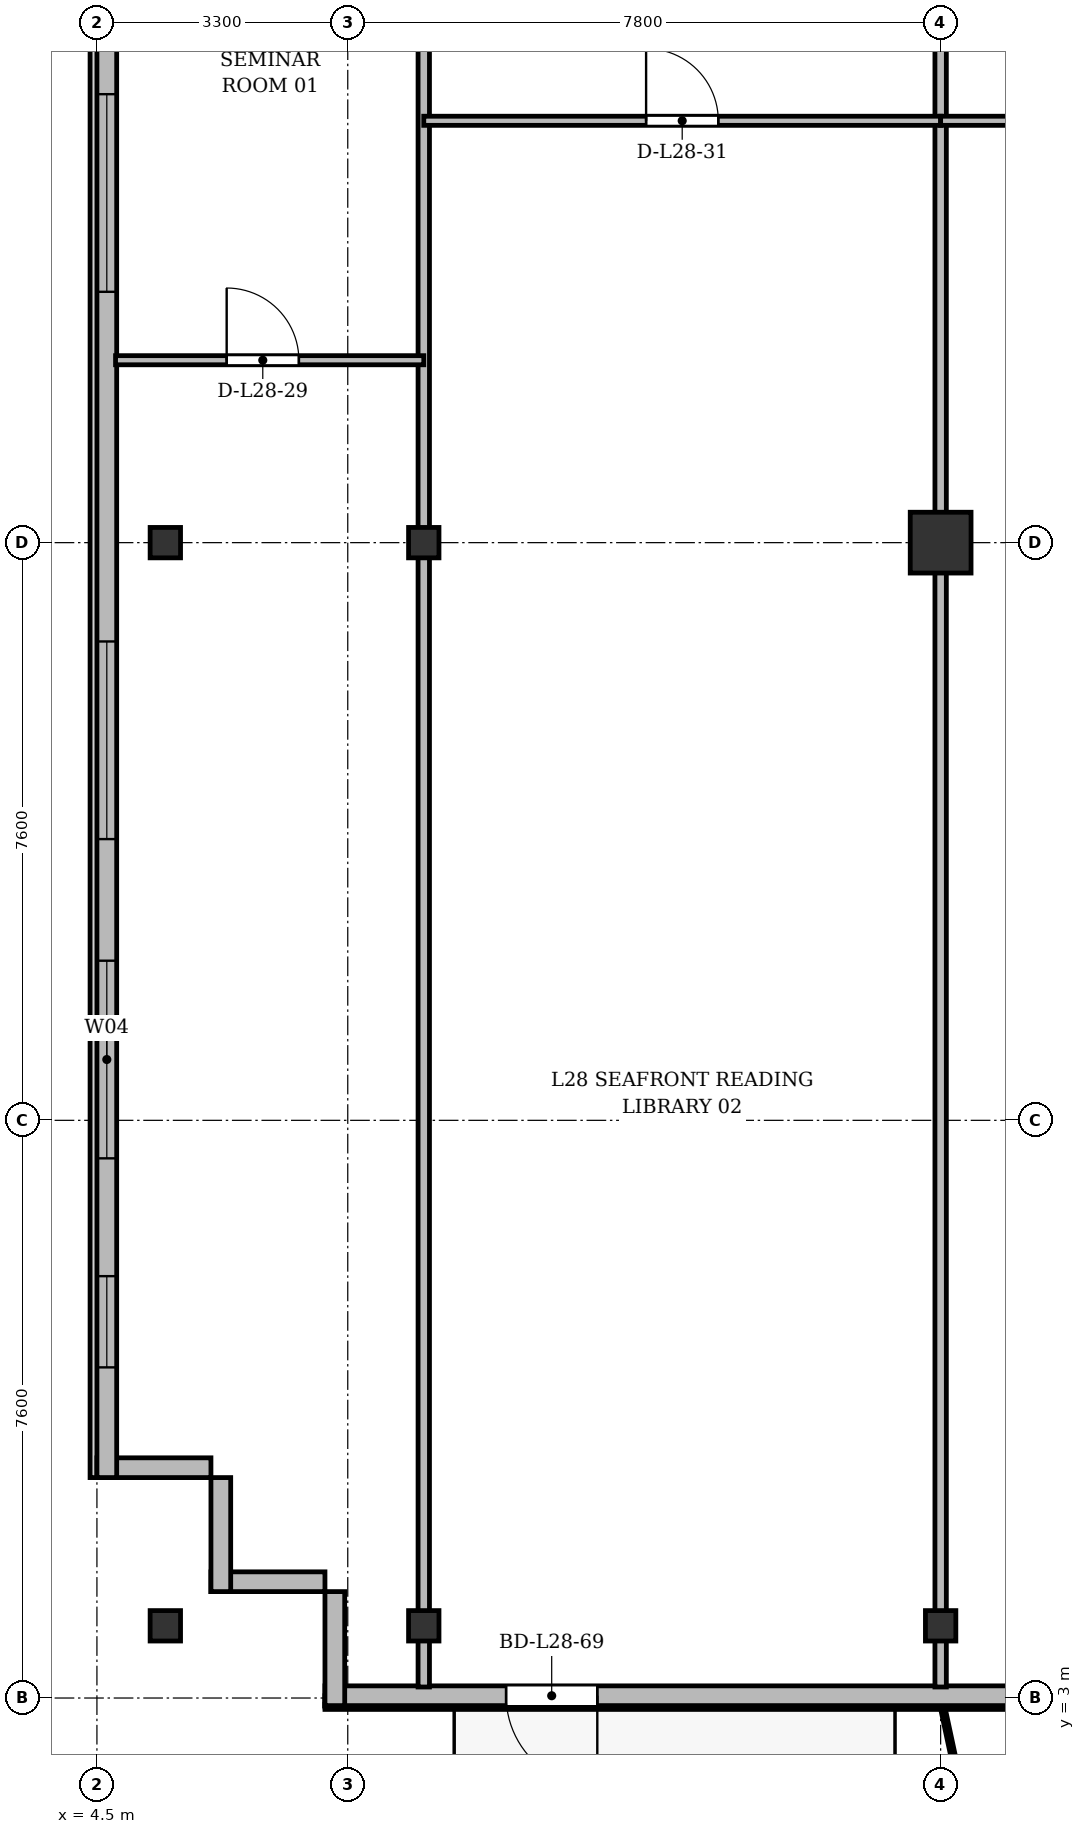
"""IFC4 building model, lengths in metres.
Left out: names, types, materials, properties, quantities, classifications, styles, units other than length and angle.
Written with IfcOpenShell. Run it as: python <this file> out.ifc"""

import sys

from ifc_helpers import new_model, si_unit, direction, frame, frame_2d, origin, origin_2d, place, context, subcontext, project, spatial, rectangle, i_section, extrude, source, transform, mapped, element, fill, save


model = new_model("IFC4")
c1 = context("Model", 3, precision=1e-05, world=origin(), true_north=direction((0.0, 1.0)))
c2 = subcontext(c1, "Body", "Model", "MODEL_VIEW")
j1 = project(units=[si_unit("LENGTHUNIT", "METRE"), si_unit("PLANEANGLEUNIT", "RADIAN")], contexts=[c1])
p1 = place(None, origin())
s1 = spatial("IfcSite", under=j1, at=p1, CompositionType="ELEMENT")
p2 = place(p1, origin())
s2 = spatial("IfcBuilding", under=s1, at=p2, CompositionType="ELEMENT")
p3 = place(p2, frame((0.0, 0.0, 110.5)))
s3 = spatial("IfcBuildingStorey", under=s2, at=p3, CompositionType="ELEMENT", Elevation=110.5)
m1 = source(origin(), c2, "Body", "SweptSolid", [
    extrude(i_section(OverallWidth=0.4, OverallDepth=0.4, WebThickness=0.022, FlangeThickness=0.035, at=origin_2d()), origin(), (0.0, 0.0, 1.0), 3.6),
])
for number, where, z_axis, x_axis in (
    (1, (5.4, 3.95, 0.0), (0.0, 0.0, 1.0), (1.0, 0.0, 0.0)),
    (2, (5.4, 18.2, 0.0), (0.0, 0.0, 1.0), (1.0, 0.0, 0.0)),
    (3, (8.8, 3.95, 0.0), (0.0, 0.0, 1.0), (1.0, 0.0, 0.0)),
    (4, (8.8, 18.2, 0.0), (0.0, 0.0, 1.0), (1.0, 0.0, 0.0)),
    (5, (15.6, 3.95, 0.0), (0.0, 0.0, 1.0), (1.0, 0.0, 0.0)),
):
    element("IfcColumn", number, at=place(p3, frame(where, z_axis=z_axis, x_axis=x_axis)), inside=s3, PredefinedType="COLUMN", context=c2, shape_type="MappedRepresentation", body=[
        mapped(m1, transform((0.0, 0.0, 0.0), x_axis=(1.0, 0.0, 0.0), y_axis=(0.0, 1.0, 0.0), z_axis=(0.0, 0.0, 1.0), scale=1.0)),
    ])
m2 = source(origin(), c2, "Body", "SweptSolid", [
    extrude(rectangle(XDim=0.8, YDim=0.8, at=origin_2d()), origin(), (0.0, 0.0, 1.0), 3.6),
])
p4 = place(p3, frame((15.6, 18.2, 0.0), z_axis=(0.0, 0.0, 1.0), x_axis=(1.0, 0.0, 0.0)))
e6 = element("IfcColumn", 6, at=p4, inside=s3, PredefinedType="COLUMN", context=c2, shape_type="MappedRepresentation", body=[
    mapped(m2, transform((0.0, 0.0, 0.0), x_axis=(1.0, 0.0, 0.0), y_axis=(0.0, 1.0, 0.0), z_axis=(0.0, 0.0, 1.0), scale=1.0)),
])
for number, where, z_axis, x_axis in (
    (7, (7.5, 4.53, 0.0), (0.0, 0.0, 1.0), (-1.0, 0.0, 0.0)),
    (8, (6.13, 4.4, 0.0), (0.0, 0.0, 1.0), (0.0, 1.0, 0.0)),
):
    element("IfcWall", number, at=place(p3, frame(where, z_axis=z_axis, x_axis=x_axis)), inside=s3, PredefinedType="SOLIDWALL", context=c2, shape_type="SweptSolid", body=[
        extrude(rectangle(XDim=1.5, YDim=0.26, at=frame_2d((0.75, 0.0))), origin(), (0.0, 0.0, 1.0), 3.34),
    ])
p5 = place(p3, frame((6.0, 6.03, 0.0), z_axis=(0.0, 0.0, 1.0), x_axis=(-1.0, 0.0, 0.0)))
e9 = element("IfcWall", 9, at=p5, inside=s3, PredefinedType="SOLIDWALL", context=c2, shape_type="SweptSolid", body=[
    extrude(rectangle(XDim=1.5, YDim=0.26, at=frame_2d((0.75, 0.0))), origin(), (0.0, 0.0, 1.0), 2.84),
])
p6 = place(p3, frame((4.63, 5.9, 0.0), z_axis=(0.0, 0.0, 1.0), x_axis=(0.0, 1.0, 0.0)))
e10 = element("IfcWall", 10, at=p6, inside=s3, PredefinedType="SOLIDWALL", context=c2, shape_type="SweptSolid", body=[
    extrude(rectangle(XDim=39.6, YDim=0.26, at=frame_2d((19.8, 0.0))), origin(), (0.0, 0.0, 1.0), 3.34),
])
p7 = place(p6, frame((1.45, 0.0, 0.92)))
e11 = element("IfcOpeningElement", 11, at=p7, cuts=e10, PredefinedType="OPENING", context=c2, shape_type="SweptSolid", body=[
    extrude(rectangle(XDim=1.2, YDim=1.65, at=frame_2d((0.6, 0.825))), frame((0.0, 0.14, 0.0), z_axis=(0.0, -1.0, 0.0), x_axis=(1.0, 0.0, 0.0)), (0.0, 0.0, 1.0), 0.28),
])
p8 = place(p6, frame((4.2, 0.0, 0.92)))
e12 = element("IfcOpeningElement", 12, at=p8, cuts=e10, PredefinedType="OPENING", context=c2, shape_type="SweptSolid", body=[
    extrude(rectangle(XDim=2.6, YDim=1.9, at=frame_2d((1.3, 0.95))), frame((0.0, 0.14, 0.0), z_axis=(0.0, -1.0, 0.0), x_axis=(1.0, 0.0, 0.0)), (0.0, 0.0, 1.0), 0.28),
])
p9 = place(p6, frame((8.4, 0.0, 0.92)))
e13 = element("IfcOpeningElement", 13, at=p9, cuts=e10, PredefinedType="OPENING", context=c2, shape_type="SweptSolid", body=[
    extrude(rectangle(XDim=2.6, YDim=1.9, at=frame_2d((1.3, 0.95))), frame((0.0, 0.14, 0.0), z_axis=(0.0, -1.0, 0.0), x_axis=(1.0, 0.0, 0.0)), (0.0, 0.0, 1.0), 0.28),
])
p10 = place(p6, frame((15.6, 0.0, 0.92)))
e14 = element("IfcOpeningElement", 14, at=p10, cuts=e10, PredefinedType="OPENING", context=c2, shape_type="SweptSolid", body=[
    extrude(rectangle(XDim=2.6, YDim=1.9, at=frame_2d((1.3, 0.95))), frame((0.0, 0.14, 0.0), z_axis=(0.0, -1.0, 0.0), x_axis=(1.0, 0.0, 0.0)), (0.0, 0.0, 1.0), 0.28),
])
p11 = place(p6, frame((29.6, 0.0, 0.92)))
e15 = element("IfcOpeningElement", 15, at=p11, cuts=e10, PredefinedType="OPENING", context=c2, shape_type="SweptSolid", body=[
    extrude(rectangle(XDim=2.6, YDim=1.9, at=frame_2d((1.3, 0.95))), frame((0.0, 0.14, 0.0), z_axis=(0.0, -1.0, 0.0), x_axis=(1.0, 0.0, 0.0)), (0.0, 0.0, 1.0), 0.28),
])
p12 = place(p6, frame((33.9, 0.0, 0.92)))
e16 = element("IfcOpeningElement", 16, at=p12, cuts=e10, PredefinedType="OPENING", context=c2, shape_type="SweptSolid", body=[
    extrude(rectangle(XDim=1.2, YDim=1.65, at=frame_2d((0.6, 0.825))), frame((0.0, 0.14, 0.0), z_axis=(0.0, -1.0, 0.0), x_axis=(1.0, 0.0, 0.0)), (0.0, 0.0, 1.0), 0.28),
])
p13 = place(p6, frame((37.25, 0.0, 0.92)))
e17 = element("IfcOpeningElement", 17, at=p13, cuts=e10, PredefinedType="OPENING", context=c2, shape_type="SweptSolid", body=[
    extrude(rectangle(XDim=1.2, YDim=1.65, at=frame_2d((0.6, 0.825))), frame((0.0, 0.14, 0.0), z_axis=(0.0, -1.0, 0.0), x_axis=(1.0, 0.0, 0.0)), (0.0, 0.0, 1.0), 0.28),
])
p14 = place(p3, frame((66.9, 3.03, 0.0), z_axis=(0.0, 0.0, 1.0), x_axis=(-1.0, 0.0, 0.0)))
e18 = element("IfcWall", 18, at=p14, inside=s3, PredefinedType="SOLIDWALL", context=c2, shape_type="SweptSolid", body=[
    extrude(rectangle(XDim=59.4, YDim=0.26, at=frame_2d((29.7, 0.0))), origin(), (0.0, 0.0, 1.0), 3.34),
])
p15 = place(p14, frame((2.175, 0.0, 0.9)))
e19 = element("IfcOpeningElement", 19, at=p15, cuts=e18, PredefinedType="OPENING", context=c2, shape_type="SweptSolid", body=[
    extrude(rectangle(XDim=1.65, YDim=1.85, at=frame_2d((0.825, 0.925))), frame((0.0, 0.14, 0.0), z_axis=(0.0, -1.0, 0.0), x_axis=(1.0, 0.0, 0.0)), (0.0, 0.0, 1.0), 0.28),
])
p16 = place(p14, frame((5.5, 0.0, 0.9)))
e20 = element("IfcOpeningElement", 20, at=p16, cuts=e18, PredefinedType="OPENING", context=c2, shape_type="SweptSolid", body=[
    extrude(rectangle(XDim=1.8, YDim=1.8, at=frame_2d((0.9, 0.9))), frame((0.0, 0.14, 0.0), z_axis=(0.0, -1.0, 0.0), x_axis=(1.0, 0.0, 0.0)), (0.0, 0.0, 1.0), 0.28),
])
p17 = place(p14, frame((9.213, 0.0, 0.0)))
e21 = element("IfcOpeningElement", 21, at=p17, cuts=e18, PredefinedType="OPENING", context=c2, shape_type="SweptSolid", body=[
    extrude(rectangle(XDim=1.2, YDim=2.2, at=frame_2d((0.6, 1.1))), frame((0.0, 0.14, 0.0), z_axis=(0.0, -1.0, 0.0), x_axis=(1.0, 0.0, 0.0)), (0.0, 0.0, 1.0), 0.28),
])
p18 = place(p14, frame((13.15, 0.0, 0.9)))
e22 = element("IfcOpeningElement", 22, at=p18, cuts=e18, PredefinedType="OPENING", context=c2, shape_type="SweptSolid", body=[
    extrude(rectangle(XDim=1.5, YDim=1.75, at=frame_2d((0.75, 0.875))), frame((0.0, 0.14, 0.0), z_axis=(0.0, -1.0, 0.0), x_axis=(1.0, 0.0, 0.0)), (0.0, 0.0, 1.0), 0.28),
])
p19 = place(p14, frame((16.7, 0.0, 0.9)))
e23 = element("IfcOpeningElement", 23, at=p19, cuts=e18, PredefinedType="OPENING", context=c2, shape_type="SweptSolid", body=[
    extrude(rectangle(XDim=2.0, YDim=1.95, at=frame_2d((1.0, 0.975))), frame((0.0, 0.14, 0.0), z_axis=(0.0, -1.0, 0.0), x_axis=(1.0, 0.0, 0.0)), (0.0, 0.0, 1.0), 0.28),
])
p20 = place(p14, frame((20.475, 0.0, 0.9)))
e24 = element("IfcOpeningElement", 24, at=p20, cuts=e18, PredefinedType="OPENING", context=c2, shape_type="SweptSolid", body=[
    extrude(rectangle(XDim=1.65, YDim=1.85, at=frame_2d((0.825, 0.925))), frame((0.0, 0.14, 0.0), z_axis=(0.0, -1.0, 0.0), x_axis=(1.0, 0.0, 0.0)), (0.0, 0.0, 1.0), 0.28),
])
p21 = place(p14, frame((25.5, 0.0, 0.9)))
e25 = element("IfcOpeningElement", 25, at=p21, cuts=e18, PredefinedType="OPENING", context=c2, shape_type="SweptSolid", body=[
    extrude(rectangle(XDim=1.8, YDim=1.8, at=frame_2d((0.9, 0.9))), frame((0.0, 0.14, 0.0), z_axis=(0.0, -1.0, 0.0), x_axis=(1.0, 0.0, 0.0)), (0.0, 0.0, 1.0), 0.28),
])
p22 = place(p14, frame((31.9, 0.0, 0.9)))
e26 = element("IfcOpeningElement", 26, at=p22, cuts=e18, PredefinedType="OPENING", context=c2, shape_type="SweptSolid", body=[
    extrude(rectangle(XDim=2.2, YDim=1.8, at=frame_2d((1.1, 0.9))), frame((0.0, 0.14, 0.0), z_axis=(0.0, -1.0, 0.0), x_axis=(1.0, 0.0, 0.0)), (0.0, 0.0, 1.0), 0.28),
])
p23 = place(p14, frame((37.584, 0.0, 0.0)))
e27 = element("IfcOpeningElement", 27, at=p23, cuts=e18, PredefinedType="OPENING", context=c2, shape_type="SweptSolid", body=[
    extrude(rectangle(XDim=1.2, YDim=2.2, at=frame_2d((0.6, 1.1))), frame((0.0, 0.14, 0.0), z_axis=(0.0, -1.0, 0.0), x_axis=(1.0, 0.0, 0.0)), (0.0, 0.0, 1.0), 0.28),
])
p24 = place(p14, frame((40.6, 0.0, 0.9)))
e28 = element("IfcOpeningElement", 28, at=p24, cuts=e18, PredefinedType="OPENING", context=c2, shape_type="SweptSolid", body=[
    extrude(rectangle(XDim=2.0, YDim=1.95, at=frame_2d((1.0, 0.975))), frame((0.0, 0.14, 0.0), z_axis=(0.0, -1.0, 0.0), x_axis=(1.0, 0.0, 0.0)), (0.0, 0.0, 1.0), 0.28),
])
p25 = place(p14, frame((46.575, 0.0, 0.9)))
e29 = element("IfcOpeningElement", 29, at=p25, cuts=e18, PredefinedType="OPENING", context=c2, shape_type="SweptSolid", body=[
    extrude(rectangle(XDim=1.65, YDim=1.85, at=frame_2d((0.825, 0.925))), frame((0.0, 0.14, 0.0), z_axis=(0.0, -1.0, 0.0), x_axis=(1.0, 0.0, 0.0)), (0.0, 0.0, 1.0), 0.28),
])
p26 = place(p14, frame((55.817, 0.0, 0.0)))
e30 = element("IfcOpeningElement", 30, at=p26, cuts=e18, PredefinedType="OPENING", context=c2, shape_type="SweptSolid", body=[
    extrude(rectangle(XDim=1.2, YDim=2.2, at=frame_2d((0.6, 1.1))), frame((0.0, 0.14, 0.0), z_axis=(0.0, -1.0, 0.0), x_axis=(1.0, 0.0, 0.0)), (0.0, 0.0, 1.0), 0.28),
])
p27 = place(p3, frame((7.63, 2.9, 0.0), z_axis=(0.0, 0.0, 1.0), x_axis=(0.0, 1.0, 0.0)))
e31 = element("IfcWall", 31, at=p27, inside=s3, PredefinedType="SOLIDWALL", context=c2, shape_type="SweptSolid", body=[
    extrude(rectangle(XDim=1.5, YDim=0.26, at=frame_2d((0.75, 0.0))), origin(), (0.0, 0.0, 1.0), 2.752),
])
for number, where, z_axis, x_axis in (
    (32, (8.8, 3.145, 0.0), (0.0, 0.0, 1.0), (0.0, 1.0, 0.0)),
    (33, (15.6, 3.145, 0.0), (0.0, 0.0, 1.0), (0.0, 1.0, 0.0)),
):
    element("IfcWall", number, at=place(p3, frame(where, z_axis=z_axis, x_axis=x_axis)), inside=s3, PredefinedType="PARTITIONING", context=c2, shape_type="SweptSolid", body=[
        extrude(rectangle(XDim=24.455, YDim=0.15, at=frame_2d((12.228, 0.0))), origin(), (0.0, 0.0, 1.0), 2.84),
    ])
p28 = place(p3, frame((4.745, 20.6, 0.0), z_axis=(0.0, 0.0, 1.0), x_axis=(1.0, 0.0, 0.0)))
e34 = element("IfcWall", 34, at=p28, inside=s3, PredefinedType="PARTITIONING", context=c2, shape_type="SweptSolid", body=[
    extrude(rectangle(XDim=4.055, YDim=0.12, at=frame_2d((2.027, 0.0))), origin(), (0.0, 0.0, 1.0), 2.84),
])
p29 = place(p28, frame((1.462, 0.0, 0.0)))
e35 = element("IfcOpeningElement", 35, at=p29, cuts=e34, PredefinedType="OPENING", context=c2, shape_type="SweptSolid", body=[
    extrude(rectangle(XDim=0.95, YDim=2.15, at=frame_2d((0.475, 1.075))), frame((0.0, 0.07, 0.0), z_axis=(0.0, -1.0, 0.0), x_axis=(1.0, 0.0, 0.0)), (0.0, 0.0, 1.0), 0.14),
])
p30 = place(p3, frame((8.8, 23.75, 0.0), z_axis=(0.0, 0.0, 1.0), x_axis=(1.0, 0.0, 0.0)))
e36 = element("IfcWall", 36, at=p30, inside=s3, PredefinedType="PARTITIONING", context=c2, shape_type="SweptSolid", body=[
    extrude(rectangle(XDim=6.8, YDim=0.12, at=frame_2d((3.4, 0.0))), origin(), (0.0, 0.0, 1.0), 2.84),
])
p31 = place(p30, frame((2.925, 0.0, 0.0)))
e37 = element("IfcOpeningElement", 37, at=p31, cuts=e36, PredefinedType="OPENING", context=c2, shape_type="SweptSolid", body=[
    extrude(rectangle(XDim=0.95, YDim=2.15, at=frame_2d((0.475, 1.075))), frame((0.0, 0.07, 0.0), z_axis=(0.0, -1.0, 0.0), x_axis=(1.0, 0.0, 0.0)), (0.0, 0.0, 1.0), 0.14),
])
p32 = place(p3, frame((15.6, 23.75, 0.0), z_axis=(0.0, 0.0, 1.0), x_axis=(1.0, 0.0, 0.0)))
e38 = element("IfcWall", 38, at=p32, inside=s3, PredefinedType="PARTITIONING", context=c2, shape_type="SweptSolid", body=[
    extrude(rectangle(XDim=7.8, YDim=0.12, at=frame_2d((3.9, 0.0))), origin(), (0.0, 0.0, 1.0), 2.84),
])
p33 = place(p32, frame((3.333, 0.0, 0.0)))
e39 = element("IfcOpeningElement", 39, at=p33, cuts=e38, PredefinedType="OPENING", context=c2, shape_type="SweptSolid", body=[
    extrude(rectangle(XDim=0.95, YDim=2.15, at=frame_2d((0.475, 1.075))), frame((0.0, 0.07, 0.0), z_axis=(0.0, -1.0, 0.0), x_axis=(1.0, 0.0, 0.0)), (0.0, 0.0, 1.0), 0.14),
])
m3 = source(origin(), c2, "Body", "SweptSolid", [
    extrude(rectangle(XDim=1.2, YDim=1.65, at=frame_2d((0.6, 0.825))), frame((0.0, 0.03, 0.0), z_axis=(0.0, -1.0, 0.0), x_axis=(1.0, 0.0, 0.0)), (0.0, 0.0, 1.0), 0.06),
])
p34 = place(p7, origin())
e40 = element("IfcWindow", 40, at=p34, inside=s3, PartitioningType="SINGLE_PANEL", PredefinedType="WINDOW", context=c2, shape_type="MappedRepresentation", body=[
    mapped(m3, transform((0.0, 0.0, 0.0), x_axis=(1.0, 0.0, 0.0), y_axis=(0.0, 1.0, 0.0), z_axis=(0.0, 0.0, 1.0), scale=1.0)),
])
fill(e11, e40)
m4 = source(origin(), c2, "Body", "SweptSolid", [
    extrude(rectangle(XDim=2.6, YDim=1.9, at=frame_2d((1.3, 0.95))), frame((0.0, 0.03, 0.0), z_axis=(0.0, -1.0, 0.0), x_axis=(1.0, 0.0, 0.0)), (0.0, 0.0, 1.0), 0.06),
])
p35 = place(p8, origin())
e41 = element("IfcWindow", 41, at=p35, inside=s3, PartitioningType="SINGLE_PANEL", PredefinedType="WINDOW", context=c2, shape_type="MappedRepresentation", body=[
    mapped(m4, transform((0.0, 0.0, 0.0), x_axis=(1.0, 0.0, 0.0), y_axis=(0.0, 1.0, 0.0), z_axis=(0.0, 0.0, 1.0), scale=1.0)),
])
fill(e12, e41)
p36 = place(p9, origin())
e42 = element("IfcWindow", 42, at=p36, inside=s3, PartitioningType="SINGLE_PANEL", PredefinedType="WINDOW", context=c2, shape_type="MappedRepresentation", body=[
    mapped(m4, transform((0.0, 0.0, 0.0), x_axis=(1.0, 0.0, 0.0), y_axis=(0.0, 1.0, 0.0), z_axis=(0.0, 0.0, 1.0), scale=1.0)),
])
fill(e13, e42)
p37 = place(p10, origin())
e43 = element("IfcWindow", 43, at=p37, inside=s3, PartitioningType="SINGLE_PANEL", PredefinedType="WINDOW", context=c2, shape_type="MappedRepresentation", body=[
    mapped(m4, transform((0.0, 0.0, 0.0), x_axis=(1.0, 0.0, 0.0), y_axis=(0.0, 1.0, 0.0), z_axis=(0.0, 0.0, 1.0), scale=1.0)),
])
fill(e14, e43)
m5 = source(origin(), c2, "Body", "SweptSolid", [
    extrude(rectangle(XDim=1.2, YDim=2.2, at=frame_2d((0.6, 1.1))), frame((0.0, 0.025, 0.0), z_axis=(0.0, -1.0, 0.0), x_axis=(1.0, 0.0, 0.0)), (0.0, 0.0, 1.0), 0.05),
])
p38 = place(p26, origin())
e44 = element("IfcDoor", 44, at=p38, inside=s3, OperationType="SINGLE_SWING_LEFT", PredefinedType="DOOR", context=c2, shape_type="MappedRepresentation", body=[
    mapped(m5, transform((0.0, 0.0, 0.0), x_axis=(1.0, 0.0, 0.0), y_axis=(0.0, 1.0, 0.0), z_axis=(0.0, 0.0, 1.0), scale=1.0)),
])
fill(e30, e44)
m6 = source(origin(), c2, "Body", "SweptSolid", [
    extrude(rectangle(XDim=0.95, YDim=2.15, at=frame_2d((0.475, 1.075))), frame((0.0, 0.025, 0.0), z_axis=(0.0, -1.0, 0.0), x_axis=(1.0, 0.0, 0.0)), (0.0, 0.0, 1.0), 0.05),
])
p39 = place(p29, origin())
e45 = element("IfcDoor", 45, at=p39, inside=s3, OperationType="SINGLE_SWING_LEFT", PredefinedType="DOOR", context=c2, shape_type="MappedRepresentation", body=[
    mapped(m6, transform((0.0, 0.0, 0.0), x_axis=(1.0, 0.0, 0.0), y_axis=(0.0, 1.0, 0.0), z_axis=(0.0, 0.0, 1.0), scale=1.0)),
])
fill(e35, e45)
p40 = place(p31, origin())
e46 = element("IfcDoor", 46, at=p40, inside=s3, OperationType="SINGLE_SWING_LEFT", PredefinedType="DOOR", context=c2, shape_type="MappedRepresentation", body=[
    mapped(m6, transform((0.0, 0.0, 0.0), x_axis=(1.0, 0.0, 0.0), y_axis=(0.0, 1.0, 0.0), z_axis=(0.0, 0.0, 1.0), scale=1.0)),
])
fill(e37, e46)
save(model, sys.argv[1])
